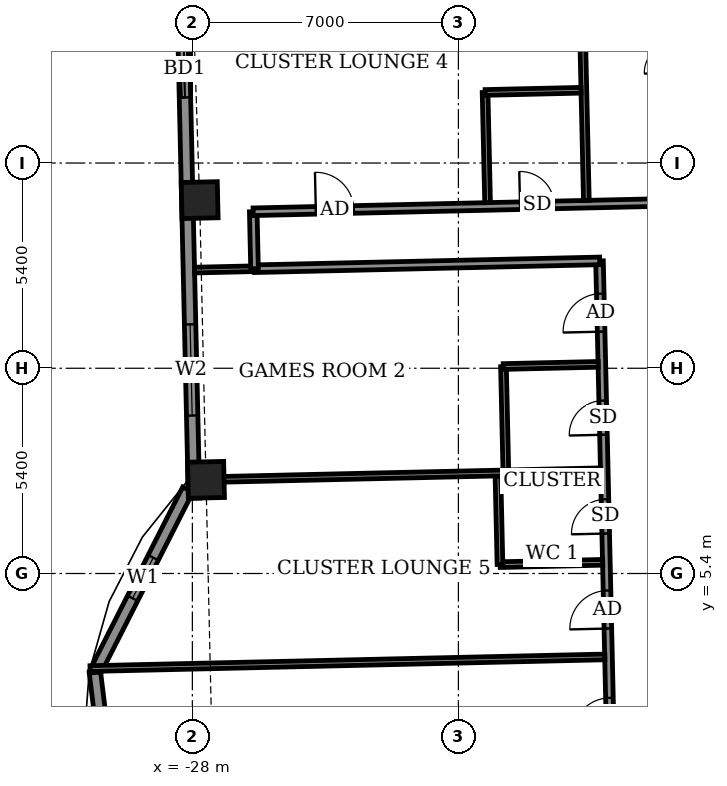
"""IFC4 building model, lengths in metres.
Left out: names, types, materials, properties, quantities, classifications, styles, units other than length and angle.
Written with IfcOpenShell. Run it as: python <this file> out.ifc"""

import sys

from ifc_helpers import new_model, si_unit, direction, frame, frame_2d, origin, origin_2d, place, context, subcontext, project, spatial, rectangle, extrude, element, fill, save


model = new_model("IFC4")
c1 = context("Model", 3, precision=1e-05, world=origin(), true_north=direction((0.0, 1.0)))
c2 = subcontext(c1, "Body", "Model", "MODEL_VIEW")
j1 = project(units=[si_unit("LENGTHUNIT", "METRE"), si_unit("PLANEANGLEUNIT", "RADIAN")], contexts=[c1])
p1 = place(None, origin())
s1 = spatial("IfcSite", under=j1, at=p1, CompositionType="ELEMENT")
p2 = place(p1, origin())
s2 = spatial("IfcBuilding", under=s1, at=p2, CompositionType="ELEMENT")
p3 = place(p2, frame((0.0, 0.0, 287.1)))
s3 = spatial("IfcBuildingStorey", under=s2, at=p3, CompositionType="ELEMENT", Elevation=287.1)
for number, where, z_axis, x_axis in (
    (1, (-27.808, 15.224, -0.55), (0.0, 0.0, 1.0), (0.023, -1.0, 0.0)),
    (2, (-27.641, 7.864, -0.55), (0.0, 0.0, 1.0), (0.023, -1.0, 0.0)),
):
    element("IfcColumn", number, at=place(p3, frame(where, z_axis=z_axis, x_axis=x_axis)), inside=s3, PredefinedType="COLUMN", context=c2, shape_type="SweptSolid", body=[
        extrude(rectangle(XDim=0.95, YDim=0.95, at=origin_2d()), origin(), (0.0, 0.0, 1.0), 3.6),
    ])
p4 = place(p3, frame((-28.297, 22.427, 0.0), z_axis=(0.0, 0.0, 1.0), x_axis=(0.022663916124, -0.999743140465, 0.0)))
e3 = element("IfcWall", 3, at=p4, inside=s3, PredefinedType="SOLIDWALL", context=c2, shape_type="SweptSolid", body=[
    extrude(rectangle(XDim=15.049, YDim=0.3, at=frame_2d((7.524, 0.0))), origin(), (0.0, 0.0, 1.0), 2.5),
])
p5 = place(p4, frame((3.002, 0.0, 0.0)))
e4 = element("IfcOpeningElement", 4, at=p5, cuts=e3, PredefinedType="OPENING", context=c2, shape_type="SweptSolid", body=[
    extrude(rectangle(XDim=1.5, YDim=2.4, at=frame_2d((0.75, 1.2))), frame((0.0, 0.16, 0.0), z_axis=(0.0, -1.0, 0.0), x_axis=(1.0, 0.0, 0.0)), (0.0, 0.0, 1.0), 0.32),
])
p6 = place(p4, frame((10.475, 0.0, 0.9)))
e5 = element("IfcOpeningElement", 5, at=p6, cuts=e3, PredefinedType="OPENING", context=c2, shape_type="SweptSolid", body=[
    extrude(rectangle(XDim=2.4, YDim=1.5, at=frame_2d((1.2, 0.75))), frame((0.0, 0.16, 0.0), z_axis=(0.0, -1.0, 0.0), x_axis=(1.0, 0.0, 0.0)), (0.0, 0.0, 1.0), 0.32),
])
p7 = place(p3, frame((-28.12, 7.608, 0.0), z_axis=(0.0, 0.0, 1.0), x_axis=(-0.45266802131, -0.891679125293, 0.0)))
e6 = element("IfcWall", 6, at=p7, inside=s3, PredefinedType="SOLIDWALL", context=c2, shape_type="SweptSolid", body=[
    extrude(rectangle(XDim=5.399, YDim=0.3, at=frame_2d((2.699, 0.0))), origin(), (0.0, 0.0, 1.0), 3.05),
])
p8 = place(p7, frame((2.008, 0.0, 0.9)))
e7 = element("IfcOpeningElement", 7, at=p8, cuts=e6, PredefinedType="OPENING", context=c2, shape_type="SweptSolid", body=[
    extrude(rectangle(XDim=1.2, YDim=1.5, at=frame_2d((0.6, 0.75))), frame((0.0, 0.16, 0.0), z_axis=(0.0, -1.0, 0.0), x_axis=(1.0, 0.0, 0.0)), (0.0, 0.0, 1.0), 0.32),
])
p9 = place(p3, frame((-30.564, 2.794, 0.0), z_axis=(0.0, 0.0, 1.0), x_axis=(0.122163831021, -0.992509948761, 0.0)))
e8 = element("IfcWall", 8, at=p9, inside=s3, PredefinedType="SOLIDWALL", context=c2, shape_type="SweptSolid", body=[
    extrude(rectangle(XDim=5.574, YDim=0.3, at=frame_2d((2.787, 0.0))), origin(), (0.0, 0.0, 1.0), 3.05),
])
p10 = place(p9, frame((2.187, 0.0, 0.9)))
e9 = element("IfcOpeningElement", 9, at=p10, cuts=e8, PredefinedType="OPENING", context=c2, shape_type="SweptSolid", body=[
    extrude(rectangle(XDim=1.2, YDim=1.5, at=frame_2d((0.6, 0.75))), frame((0.0, 0.16, 0.0), z_axis=(0.0, -1.0, 0.0), x_axis=(1.0, 0.0, 0.0)), (0.0, 0.0, 1.0), 0.32),
])
p11 = place(p3, frame((-30.915, 15.916, 0.0), z_axis=(0.0, 0.0, 1.0), x_axis=(-0.022665943652, 0.999743094499, 0.0)))
e10 = element("IfcWall", 10, at=p11, inside=s3, PredefinedType="USERDEFINED", context=c2, shape_type="SweptSolid", body=[
    extrude(rectangle(XDim=6.0, YDim=0.55, at=frame_2d((3.0, 0.0))), origin(), (0.0, 0.0, 1.0), 0.8),
])
p12 = place(p3, frame((-16.684, -12.919, 0.0), z_axis=(0.0, 0.0, 1.0), x_axis=(-0.022712214871, 0.999742044377, 0.0)))
e11 = element("IfcWall", 11, at=p12, inside=s3, PredefinedType="PARTITIONING", context=c2, shape_type="SweptSolid", body=[
    extrude(rectangle(XDim=26.551, YDim=0.2, at=frame_2d((13.275, 0.0))), origin(), (0.0, 0.0, 1.0), 3.05),
])
p13 = place(p12, frame((24.688, 0.0, 0.0)))
e12 = element("IfcOpeningElement", 12, at=p13, cuts=e11, PredefinedType="OPENING", context=c2, shape_type="SweptSolid", body=[
    extrude(rectangle(XDim=1.0, YDim=2.1, at=frame_2d((0.5, 1.05))), frame((0.0, 0.11, 0.0), z_axis=(0.0, -1.0, 0.0), x_axis=(1.0, 0.0, 0.0)), (0.0, 0.0, 1.0), 0.22),
])
p14 = place(p12, frame((21.975, 0.0, 0.0)))
e13 = element("IfcOpeningElement", 13, at=p14, cuts=e11, PredefinedType="OPENING", context=c2, shape_type="SweptSolid", body=[
    extrude(rectangle(XDim=0.9, YDim=2.1, at=frame_2d((0.45, 1.05))), frame((0.0, 0.11, 0.0), z_axis=(0.0, -1.0, 0.0), x_axis=(1.0, 0.0, 0.0)), (0.0, 0.0, 1.0), 0.22),
])
p15 = place(p12, frame((16.875, 0.0, 0.0)))
e14 = element("IfcOpeningElement", 14, at=p15, cuts=e11, PredefinedType="OPENING", context=c2, shape_type="SweptSolid", body=[
    extrude(rectangle(XDim=1.0, YDim=2.1, at=frame_2d((0.5, 1.05))), frame((0.0, 0.11, 0.0), z_axis=(0.0, -1.0, 0.0), x_axis=(1.0, 0.0, 0.0)), (0.0, 0.0, 1.0), 0.22),
])
p16 = place(p12, frame((19.375, 0.0, 0.0)))
e15 = element("IfcOpeningElement", 15, at=p16, cuts=e11, PredefinedType="OPENING", context=c2, shape_type="SweptSolid", body=[
    extrude(rectangle(XDim=0.9, YDim=2.1, at=frame_2d((0.45, 1.05))), frame((0.0, 0.11, 0.0), z_axis=(0.0, -1.0, 0.0), x_axis=(1.0, 0.0, 0.0)), (0.0, 0.0, 1.0), 0.22),
])
p17 = place(p12, frame((14.05, 0.0, 0.0)))
e16 = element("IfcOpeningElement", 16, at=p17, cuts=e11, PredefinedType="OPENING", context=c2, shape_type="SweptSolid", body=[
    extrude(rectangle(XDim=1.0, YDim=2.1, at=frame_2d((0.5, 1.05))), frame((0.0, 0.11, 0.0), z_axis=(0.0, -1.0, 0.0), x_axis=(1.0, 0.0, 0.0)), (0.0, 0.0, 1.0), 0.22),
])
p18 = place(p12, frame((11.225, 0.0, 0.0)))
e17 = element("IfcOpeningElement", 17, at=p18, cuts=e11, PredefinedType="OPENING", context=c2, shape_type="SweptSolid", body=[
    extrude(rectangle(XDim=0.9, YDim=2.1, at=frame_2d((0.45, 1.05))), frame((0.0, 0.11, 0.0), z_axis=(0.0, -1.0, 0.0), x_axis=(1.0, 0.0, 0.0)), (0.0, 0.0, 1.0), 0.22),
])
p19 = place(p12, frame((8.37, 0.0, 0.0)))
e18 = element("IfcOpeningElement", 18, at=p19, cuts=e11, PredefinedType="OPENING", context=c2, shape_type="SweptSolid", body=[
    extrude(rectangle(XDim=1.0, YDim=2.1, at=frame_2d((0.5, 1.05))), frame((0.0, 0.11, 0.0), z_axis=(0.0, -1.0, 0.0), x_axis=(1.0, 0.0, 0.0)), (0.0, 0.0, 1.0), 0.22),
])
p20 = place(p12, frame((5.263, 0.0, 0.0)))
e19 = element("IfcOpeningElement", 19, at=p20, cuts=e11, PredefinedType="OPENING", context=c2, shape_type="SweptSolid", body=[
    extrude(rectangle(XDim=1.0, YDim=2.1, at=frame_2d((0.5, 1.05))), frame((0.0, 0.11, 0.0), z_axis=(0.0, -1.0, 0.0), x_axis=(1.0, 0.0, 0.0)), (0.0, 0.0, 1.0), 0.22),
])
p21 = place(p12, frame((0.425, 0.0, 0.0)))
e20 = element("IfcOpeningElement", 20, at=p21, cuts=e11, PredefinedType="OPENING", context=c2, shape_type="SweptSolid", body=[
    extrude(rectangle(XDim=1.0, YDim=2.1, at=frame_2d((0.5, 1.05))), frame((0.0, 0.11, 0.0), z_axis=(0.0, -1.0, 0.0), x_axis=(1.0, 0.0, 0.0)), (0.0, 0.0, 1.0), 0.22),
])
p22 = place(p12, frame((2.6, 0.0, 0.0)))
e21 = element("IfcOpeningElement", 21, at=p22, cuts=e11, PredefinedType="OPENING", context=c2, shape_type="SweptSolid", body=[
    extrude(rectangle(XDim=0.9, YDim=2.1, at=frame_2d((0.45, 1.05))), frame((0.0, 0.11, 0.0), z_axis=(0.0, -1.0, 0.0), x_axis=(1.0, 0.0, 0.0)), (0.0, 0.0, 1.0), 0.22),
])
p23 = place(p3, frame((-30.692, 2.898, 0.0), z_axis=(0.0, 0.0, 1.0), x_axis=(0.999743099019, 0.022665744279, 0.0)))
e22 = element("IfcWall", 22, at=p23, inside=s3, PredefinedType="PARTITIONING", context=c2, shape_type="SweptSolid", body=[
    extrude(rectangle(XDim=13.55, YDim=0.15, at=frame_2d((6.775, 0.0))), origin(), (0.0, 0.0, 1.0), 2.1),
])
p24 = place(p3, frame((-19.901, 5.633, 0.0), z_axis=(0.0, 0.0, 1.0), x_axis=(0.999744396973, 0.02260842146, 0.0)))
e23 = element("IfcWall", 23, at=p24, inside=s3, PredefinedType="PARTITIONING", context=c2, shape_type="SweptSolid", body=[
    extrude(rectangle(XDim=2.7, YDim=0.15, at=frame_2d((1.35, 0.0))), origin(), (0.0, 0.0, 1.0), 3.05),
])
p25 = place(p3, frame((-19.906, 5.638, 0.0), z_axis=(0.0, 0.0, 1.0), x_axis=(-0.022781023197, 0.999740478815, 0.0)))
e24 = element("IfcWall", 24, at=p25, inside=s3, PredefinedType="PARTITIONING", context=c2, shape_type="SweptSolid", body=[
    extrude(rectangle(XDim=2.325, YDim=0.15, at=frame_2d((1.163, 0.0))), origin(), (0.0, 0.0, 1.0), 3.05),
])
p26 = place(p3, frame((-19.752, 8.117, 0.0), z_axis=(0.0, 0.0, 1.0), x_axis=(-0.022749889061, 0.999741187782, 0.0)))
e25 = element("IfcWall", 25, at=p26, inside=s3, PredefinedType="PARTITIONING", context=c2, shape_type="SweptSolid", body=[
    extrude(rectangle(XDim=2.726, YDim=0.15, at=frame_2d((1.363, 0.0))), origin(), (0.0, 0.0, 1.0), 3.05),
])
p27 = place(p3, frame((-27.817, 7.864, 0.0), z_axis=(0.0, 0.0, 1.0), x_axis=(0.9997418952, 0.022718780382, 0.0)))
e26 = element("IfcWall", 26, at=p27, inside=s3, PredefinedType="PARTITIONING", context=c2, shape_type="SweptSolid", body=[
    extrude(rectangle(XDim=10.563, YDim=0.15, at=frame_2d((5.282, 0.0))), origin(), (0.0, 0.0, 1.0), 3.05),
])
p28 = place(p3, frame((-19.819, 10.846, 0.0), z_axis=(0.0, 0.0, 1.0), x_axis=(0.999738801317, 0.022854521249, 0.0)))
e27 = element("IfcWall", 27, at=p28, inside=s3, PredefinedType="PARTITIONING", context=c2, shape_type="SweptSolid", body=[
    extrude(rectangle(XDim=2.5, YDim=0.15, at=frame_2d((1.25, 0.0))), origin(), (0.0, 0.0, 1.0), 3.05),
])
p29 = place(p3, frame((-27.942, 13.383, 0.0), z_axis=(0.0, 0.0, 1.0), x_axis=(0.999741755729, 0.022724916977, 0.0)))
e28 = element("IfcWall", 28, at=p29, inside=s3, PredefinedType="PARTITIONING", context=c2, shape_type="SweptSolid", body=[
    extrude(rectangle(XDim=1.579, YDim=0.15, at=frame_2d((0.79, 0.0))), origin(), (0.0, 0.0, 1.0), 2.5),
])
p30 = place(p3, frame((-26.367, 13.419, 0.0), z_axis=(0.0, 0.0, 1.0), x_axis=(0.999742888587, 0.022675024131, 0.0)))
e29 = element("IfcWall", 29, at=p30, inside=s3, PredefinedType="PARTITIONING", context=c2, shape_type="SweptSolid", body=[
    extrude(rectangle(XDim=9.087, YDim=0.2, at=frame_2d((4.544, 0.0))), origin(), (0.0, 0.0, 1.0), 3.05),
])
p31 = place(p3, frame((-26.364, 13.419, 0.0), z_axis=(0.0, 0.0, 1.0), x_axis=(-0.022632637625, 0.99974384905, 0.0)))
e30 = element("IfcWall", 30, at=p31, inside=s3, PredefinedType="PARTITIONING", context=c2, shape_type="SweptSolid", body=[
    extrude(rectangle(XDim=1.5, YDim=0.2, at=frame_2d((0.75, 0.0))), origin(), (0.0, 0.0, 1.0), 3.05),
])
p32 = place(p3, frame((-26.401, 14.918, 0.0), z_axis=(0.0, 0.0, 1.0), x_axis=(0.99974239733, 0.022696673341, 0.0)))
e31 = element("IfcWall", 31, at=p32, inside=s3, PredefinedType="PARTITIONING", context=c2, shape_type="SweptSolid", body=[
    extrude(rectangle(XDim=55.386, YDim=0.2, at=frame_2d((27.693, 0.0))), origin(), (0.0, 0.0, 1.0), 3.05),
])
p33 = place(p32, frame((52.889, 0.0, 0.0)))
e32 = element("IfcOpeningElement", 32, at=p33, cuts=e31, PredefinedType="OPENING", context=c2, shape_type="SweptSolid", body=[
    extrude(rectangle(XDim=1.0, YDim=2.1, at=frame_2d((0.5, 1.05))), frame((0.0, 0.11, 0.0), z_axis=(0.0, -1.0, 0.0), x_axis=(1.0, 0.0, 0.0)), (0.0, 0.0, 1.0), 0.22),
])
p34 = place(p32, frame((48.6, 0.0, 0.0)))
e33 = element("IfcOpeningElement", 33, at=p34, cuts=e31, PredefinedType="OPENING", context=c2, shape_type="SweptSolid", body=[
    extrude(rectangle(XDim=0.9, YDim=2.1, at=frame_2d((0.45, 1.05))), frame((0.0, 0.11, 0.0), z_axis=(0.0, -1.0, 0.0), x_axis=(1.0, 0.0, 0.0)), (0.0, 0.0, 1.0), 0.22),
])
p35 = place(p32, frame((41.8, 0.0, 0.0)))
e34 = element("IfcOpeningElement", 34, at=p35, cuts=e31, PredefinedType="OPENING", context=c2, shape_type="SweptSolid", body=[
    extrude(rectangle(XDim=0.9, YDim=2.1, at=frame_2d((0.45, 1.05))), frame((0.0, 0.11, 0.0), z_axis=(0.0, -1.0, 0.0), x_axis=(1.0, 0.0, 0.0)), (0.0, 0.0, 1.0), 0.22),
])
p36 = place(p32, frame((39.675, 0.0, 0.0)))
e35 = element("IfcOpeningElement", 35, at=p36, cuts=e31, PredefinedType="OPENING", context=c2, shape_type="SweptSolid", body=[
    extrude(rectangle(XDim=0.9, YDim=2.1, at=frame_2d((0.45, 1.05))), frame((0.0, 0.11, 0.0), z_axis=(0.0, -1.0, 0.0), x_axis=(1.0, 0.0, 0.0)), (0.0, 0.0, 1.0), 0.22),
])
p37 = place(p32, frame((32.675, 0.0, 0.0)))
e36 = element("IfcOpeningElement", 36, at=p37, cuts=e31, PredefinedType="OPENING", context=c2, shape_type="SweptSolid", body=[
    extrude(rectangle(XDim=0.9, YDim=2.1, at=frame_2d((0.45, 1.05))), frame((0.0, 0.11, 0.0), z_axis=(0.0, -1.0, 0.0), x_axis=(1.0, 0.0, 0.0)), (0.0, 0.0, 1.0), 0.22),
])
p38 = place(p32, frame((30.4, 0.0, 0.0)))
e37 = element("IfcOpeningElement", 37, at=p38, cuts=e31, PredefinedType="OPENING", context=c2, shape_type="SweptSolid", body=[
    extrude(rectangle(XDim=0.9, YDim=2.1, at=frame_2d((0.45, 1.05))), frame((0.0, 0.11, 0.0), z_axis=(0.0, -1.0, 0.0), x_axis=(1.0, 0.0, 0.0)), (0.0, 0.0, 1.0), 0.22),
])
p39 = place(p32, frame((23.225, 0.0, 0.0)))
e38 = element("IfcOpeningElement", 38, at=p39, cuts=e31, PredefinedType="OPENING", context=c2, shape_type="SweptSolid", body=[
    extrude(rectangle(XDim=0.9, YDim=2.1, at=frame_2d((0.45, 1.05))), frame((0.0, 0.11, 0.0), z_axis=(0.0, -1.0, 0.0), x_axis=(1.0, 0.0, 0.0)), (0.0, 0.0, 1.0), 0.22),
])
p40 = place(p32, frame((20.9, 0.0, 0.0)))
e39 = element("IfcOpeningElement", 39, at=p40, cuts=e31, PredefinedType="OPENING", context=c2, shape_type="SweptSolid", body=[
    extrude(rectangle(XDim=0.9, YDim=2.1, at=frame_2d((0.45, 1.05))), frame((0.0, 0.11, 0.0), z_axis=(0.0, -1.0, 0.0), x_axis=(1.0, 0.0, 0.0)), (0.0, 0.0, 1.0), 0.22),
])
p41 = place(p32, frame((13.9, 0.0, 0.0)))
e40 = element("IfcOpeningElement", 40, at=p41, cuts=e31, PredefinedType="OPENING", context=c2, shape_type="SweptSolid", body=[
    extrude(rectangle(XDim=0.9, YDim=2.1, at=frame_2d((0.45, 1.05))), frame((0.0, 0.11, 0.0), z_axis=(0.0, -1.0, 0.0), x_axis=(1.0, 0.0, 0.0)), (0.0, 0.0, 1.0), 0.22),
])
p42 = place(p32, frame((11.775, 0.0, 0.0)))
e41 = element("IfcOpeningElement", 41, at=p42, cuts=e31, PredefinedType="OPENING", context=c2, shape_type="SweptSolid", body=[
    extrude(rectangle(XDim=0.9, YDim=2.1, at=frame_2d((0.45, 1.05))), frame((0.0, 0.11, 0.0), z_axis=(0.0, -1.0, 0.0), x_axis=(1.0, 0.0, 0.0)), (0.0, 0.0, 1.0), 0.22),
])
p43 = place(p32, frame((1.65, 0.0, 0.0)))
e42 = element("IfcOpeningElement", 42, at=p43, cuts=e31, PredefinedType="OPENING", context=c2, shape_type="SweptSolid", body=[
    extrude(rectangle(XDim=1.0, YDim=2.1, at=frame_2d((0.5, 1.05))), frame((0.0, 0.11, 0.0), z_axis=(0.0, -1.0, 0.0), x_axis=(1.0, 0.0, 0.0)), (0.0, 0.0, 1.0), 0.22),
])
p44 = place(p32, frame((7.025, 0.0, 0.0)))
e43 = element("IfcOpeningElement", 43, at=p44, cuts=e31, PredefinedType="OPENING", context=c2, shape_type="SweptSolid", body=[
    extrude(rectangle(XDim=0.9, YDim=2.1, at=frame_2d((0.45, 1.05))), frame((0.0, 0.11, 0.0), z_axis=(0.0, -1.0, 0.0), x_axis=(1.0, 0.0, 0.0)), (0.0, 0.0, 1.0), 0.22),
])
p45 = place(p3, frame((-20.232, 15.158, 0.0), z_axis=(0.0, 0.0, 1.0), x_axis=(-0.022817032779, 0.999739657619, 0.0)))
e44 = element("IfcWall", 44, at=p45, inside=s3, PredefinedType="PARTITIONING", context=c2, shape_type="SweptSolid", body=[
    extrude(rectangle(XDim=2.9, YDim=0.15, at=frame_2d((1.45, 0.0))), origin(), (0.0, 0.0, 1.0), 3.05),
])
p46 = place(p3, frame((-17.633, 15.217, 0.0), z_axis=(0.0, 0.0, 1.0), x_axis=(-0.02263844782, 0.9997437175, 0.0)))
e45 = element("IfcWall", 45, at=p46, inside=s3, PredefinedType="PARTITIONING", context=c2, shape_type="SweptSolid", body=[
    extrude(rectangle(XDim=12.1, YDim=0.15, at=frame_2d((6.05, 0.0))), origin(), (0.0, 0.0, 1.0), 2.55),
])
p47 = place(p3, frame((-20.296, 18.057, 0.0), z_axis=(0.0, 0.0, 1.0), x_axis=(0.999735102249, 0.023015762656, 0.0)))
e46 = element("IfcWall", 46, at=p47, inside=s3, PredefinedType="PARTITIONING", context=c2, shape_type="SweptSolid", body=[
    extrude(rectangle(XDim=2.525, YDim=0.15, at=frame_2d((1.262, 0.0))), origin(), (0.0, 0.0, 1.0), 3.05),
])
p48 = place(p5, origin())
e47 = element("IfcDoor", 47, at=p48, inside=s3, OperationType="SLIDING_TO_LEFT", PredefinedType="DOOR", context=c2, shape_type="SweptSolid", body=[
    extrude(rectangle(XDim=1.5, YDim=2.4, at=frame_2d((0.75, 1.2))), frame((0.0, 0.025, 0.0), z_axis=(0.0, -1.0, 0.0), x_axis=(1.0, 0.0, 0.0)), (0.0, 0.0, 1.0), 0.05),
])
fill(e4, e47)
p49 = place(p6, origin())
e48 = element("IfcWindow", 48, at=p49, inside=s3, PartitioningType="DOUBLE_PANEL_VERTICAL", PredefinedType="WINDOW", context=c2, shape_type="SweptSolid", body=[
    extrude(rectangle(XDim=2.4, YDim=1.5, at=frame_2d((1.2, 0.75))), frame((0.0, 0.03, 0.0), z_axis=(0.0, -1.0, 0.0), x_axis=(1.0, 0.0, 0.0)), (0.0, 0.0, 1.0), 0.06),
])
fill(e5, e48)
p50 = place(p8, origin())
e49 = element("IfcWindow", 49, at=p50, inside=s3, PartitioningType="SINGLE_PANEL", PredefinedType="WINDOW", context=c2, shape_type="SweptSolid", body=[
    extrude(rectangle(XDim=1.2, YDim=1.5, at=frame_2d((0.6, 0.75))), frame((0.0, 0.03, 0.0), z_axis=(0.0, -1.0, 0.0), x_axis=(1.0, 0.0, 0.0)), (0.0, 0.0, 1.0), 0.06),
])
fill(e7, e49)
p51 = place(p43, origin())
e50 = element("IfcDoor", 50, at=p51, inside=s3, OperationType="SINGLE_SWING_RIGHT", PredefinedType="DOOR", context=c2, shape_type="SweptSolid", body=[
    extrude(rectangle(XDim=1.0, YDim=2.1, at=frame_2d((0.5, 1.05))), frame((0.0, 0.025, 0.0), z_axis=(0.0, -1.0, 0.0), x_axis=(1.0, 0.0, 0.0)), (0.0, 0.0, 1.0), 0.05),
])
fill(e42, e50)
p52 = place(p44, origin())
e51 = element("IfcDoor", 51, at=p52, inside=s3, OperationType="SINGLE_SWING_LEFT", PredefinedType="DOOR", context=c2, shape_type="SweptSolid", body=[
    extrude(rectangle(XDim=0.9, YDim=2.1, at=frame_2d((0.45, 1.05))), frame((0.0, 0.025, 0.0), z_axis=(0.0, -1.0, 0.0), x_axis=(1.0, 0.0, 0.0)), (0.0, 0.0, 1.0), 0.05),
])
fill(e43, e51)
p53 = place(p13, origin())
e52 = element("IfcDoor", 52, at=p53, inside=s3, OperationType="SINGLE_SWING_LEFT", PredefinedType="DOOR", context=c2, shape_type="SweptSolid", body=[
    extrude(rectangle(XDim=1.0, YDim=2.1, at=frame_2d((0.5, 1.05))), frame((0.0, 0.025, 0.0), z_axis=(0.0, -1.0, 0.0), x_axis=(1.0, 0.0, 0.0)), (0.0, 0.0, 1.0), 0.05),
])
fill(e12, e52)
p54 = place(p14, origin())
e53 = element("IfcDoor", 53, at=p54, inside=s3, OperationType="SINGLE_SWING_RIGHT", PredefinedType="DOOR", context=c2, shape_type="SweptSolid", body=[
    extrude(rectangle(XDim=0.9, YDim=2.1, at=frame_2d((0.45, 1.05))), frame((0.0, 0.025, 0.0), z_axis=(0.0, -1.0, 0.0), x_axis=(1.0, 0.0, 0.0)), (0.0, 0.0, 1.0), 0.05),
])
fill(e13, e53)
p55 = place(p15, origin())
e54 = element("IfcDoor", 54, at=p55, inside=s3, OperationType="SINGLE_SWING_RIGHT", PredefinedType="DOOR", context=c2, shape_type="SweptSolid", body=[
    extrude(rectangle(XDim=1.0, YDim=2.1, at=frame_2d((0.5, 1.05))), frame((0.0, 0.025, 0.0), z_axis=(0.0, -1.0, 0.0), x_axis=(1.0, 0.0, 0.0)), (0.0, 0.0, 1.0), 0.05),
])
fill(e14, e54)
p56 = place(p16, origin())
e55 = element("IfcDoor", 55, at=p56, inside=s3, OperationType="SINGLE_SWING_LEFT", PredefinedType="DOOR", context=c2, shape_type="SweptSolid", body=[
    extrude(rectangle(XDim=0.9, YDim=2.1, at=frame_2d((0.45, 1.05))), frame((0.0, 0.025, 0.0), z_axis=(0.0, -1.0, 0.0), x_axis=(1.0, 0.0, 0.0)), (0.0, 0.0, 1.0), 0.05),
])
fill(e15, e55)
p57 = place(p17, origin())
e56 = element("IfcDoor", 56, at=p57, inside=s3, OperationType="SINGLE_SWING_LEFT", PredefinedType="DOOR", context=c2, shape_type="SweptSolid", body=[
    extrude(rectangle(XDim=1.0, YDim=2.1, at=frame_2d((0.5, 1.05))), frame((0.0, 0.025, 0.0), z_axis=(0.0, -1.0, 0.0), x_axis=(1.0, 0.0, 0.0)), (0.0, 0.0, 1.0), 0.05),
])
fill(e16, e56)
save(model, sys.argv[1])
